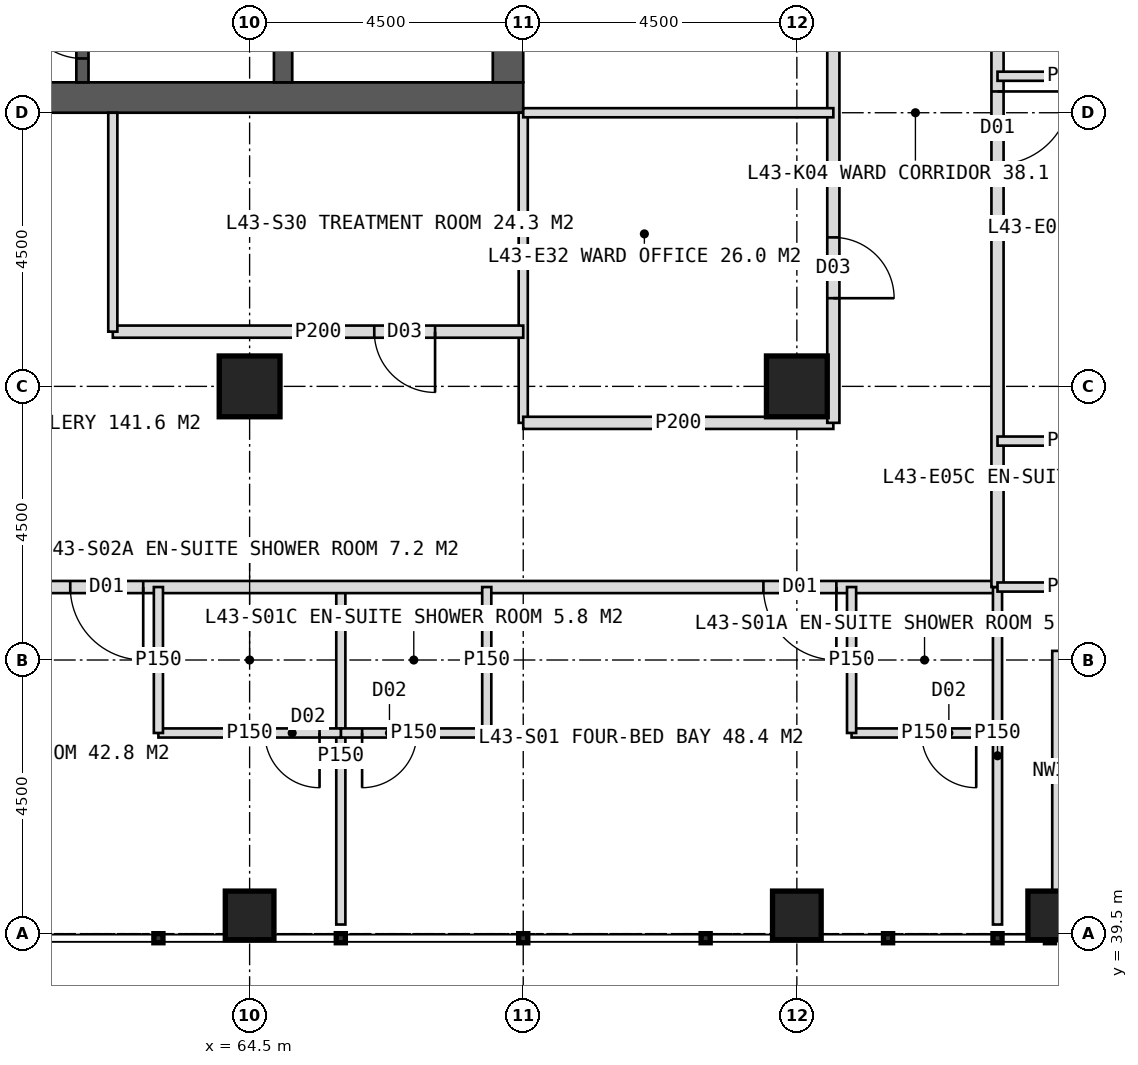
"""IFC4 building model, lengths in metres.
Left out: names, types, materials, properties, quantities, classifications, styles, units other than length and angle.
Written with IfcOpenShell. Run it as: python <this file> out.ifc"""

import sys

from ifc_helpers import new_model, si_unit, direction, frame, frame_2d, origin, origin_2d, place, context, subcontext, project, spatial, rectangle, hollow_rectangle, extrude, element, fill, save


model = new_model("IFC4")
c1 = context("Model", 3, precision=1e-05, world=origin(), true_north=direction((0.0, 1.0)))
c2 = subcontext(c1, "Body", "Model", "MODEL_VIEW")
j1 = project(units=[si_unit("LENGTHUNIT", "METRE"), si_unit("PLANEANGLEUNIT", "RADIAN")], contexts=[c1])
p1 = place(None, origin())
s1 = spatial("IfcSite", under=j1, at=p1, CompositionType="ELEMENT")
p2 = place(p1, origin())
s2 = spatial("IfcBuilding", under=s1, at=p2, CompositionType="ELEMENT")
p3 = place(p2, frame((0.0, 0.0, 181.0)))
s3 = spatial("IfcBuildingStorey", under=s2, at=p3, CompositionType="ELEMENT", Elevation=181.0)
p4 = place(p3, frame((51.0, 53.25, 0.0), z_axis=(0.0, 0.0, 1.0), x_axis=(1.0, 0.0, 0.0)))
e1 = element("IfcWall", 1, at=p4, inside=s3, PredefinedType="SHEAR", context=c2, shape_type="SweptSolid", body=[
    extrude(rectangle(XDim=18.0, YDim=0.5, at=frame_2d((9.0, 0.0))), origin(), (0.0, 0.0, 1.0), 4.0),
])
p5 = place(p4, frame((8.1, 0.0, 0.0)))
e2 = element("IfcOpeningElement", 2, at=p5, cuts=e1, PredefinedType="OPENING", context=c2, shape_type="SweptSolid", body=[
    extrude(rectangle(XDim=1.8, YDim=2.2, at=frame_2d((0.9, 1.1))), frame((0.0, 0.26, 0.0), z_axis=(0.0, -1.0, 0.0), x_axis=(1.0, 0.0, 0.0)), (0.0, 0.0, 1.0), 0.52),
])
p6 = place(p3, frame((68.75, 53.5, 0.0), z_axis=(0.0, 0.0, 1.0), x_axis=(0.0, 1.0, 0.0)))
e3 = element("IfcWall", 3, at=p6, inside=s3, PredefinedType="SHEAR", context=c2, shape_type="SweptSolid", body=[
    extrude(rectangle(XDim=17.0, YDim=0.5, at=frame_2d((8.5, 0.0))), origin(), (0.0, 0.0, 1.0), 4.0),
])
p7 = place(p6, frame((9.6, 0.0, 0.0)))
e4 = element("IfcOpeningElement", 4, at=p7, cuts=e3, PredefinedType="OPENING", context=c2, shape_type="SweptSolid", body=[
    extrude(rectangle(XDim=1.5, YDim=2.2, at=frame_2d((0.75, 1.1))), frame((0.0, 0.26, 0.0), z_axis=(0.0, -1.0, 0.0), x_axis=(1.0, 0.0, 0.0)), (0.0, 0.0, 1.0), 0.52),
])
p8 = place(p3, frame((65.05, 53.5, 0.0), z_axis=(0.0, 0.0, 1.0), x_axis=(0.0, 1.0, 0.0)))
e5 = element("IfcWall", 5, at=p8, inside=s3, PredefinedType="SHEAR", context=c2, shape_type="SweptSolid", body=[
    extrude(rectangle(XDim=17.0, YDim=0.3, at=frame_2d((8.5, 0.0))), origin(), (0.0, 0.0, 1.0), 4.0),
])
p9 = place(p3, frame((61.75, 53.5, 0.0), z_axis=(0.0, 0.0, 1.0), x_axis=(0.0, 1.0, 0.0)))
e6 = element("IfcWall", 6, at=p9, inside=s3, PredefinedType="SHEAR", context=c2, shape_type="SweptSolid", body=[
    extrude(rectangle(XDim=17.0, YDim=0.2, at=frame_2d((8.5, 0.0))), origin(), (0.0, 0.0, 1.0), 4.0),
])
p10 = place(p9, frame((0.393, 0.0, 0.0)))
e7 = element("IfcOpeningElement", 7, at=p10, cuts=e6, PredefinedType="OPENING", context=c2, shape_type="SweptSolid", body=[
    extrude(rectangle(XDim=1.0, YDim=2.1, at=frame_2d((0.5, 1.05))), frame((0.0, 0.11, 0.0), z_axis=(0.0, -1.0, 0.0), x_axis=(1.0, 0.0, 0.0)), (0.0, 0.0, 1.0), 0.22),
])
p11 = place(p9, frame((2.542, 0.0, 0.0)))
e8 = element("IfcOpeningElement", 8, at=p11, cuts=e6, PredefinedType="OPENING", context=c2, shape_type="SweptSolid", body=[
    extrude(rectangle(XDim=1.0, YDim=2.1, at=frame_2d((0.5, 1.05))), frame((0.0, 0.11, 0.0), z_axis=(0.0, -1.0, 0.0), x_axis=(1.0, 0.0, 0.0)), (0.0, 0.0, 1.0), 0.22),
])
p12 = place(p9, frame((5.127, 0.0, 0.0)))
e9 = element("IfcOpeningElement", 9, at=p12, cuts=e6, PredefinedType="OPENING", context=c2, shape_type="SweptSolid", body=[
    extrude(rectangle(XDim=1.0, YDim=2.1, at=frame_2d((0.5, 1.05))), frame((0.0, 0.11, 0.0), z_axis=(0.0, -1.0, 0.0), x_axis=(1.0, 0.0, 0.0)), (0.0, 0.0, 1.0), 0.22),
])
p13 = place(p9, frame((7.228, 0.0, 0.0)))
e10 = element("IfcOpeningElement", 10, at=p13, cuts=e6, PredefinedType="OPENING", context=c2, shape_type="SweptSolid", body=[
    extrude(rectangle(XDim=1.0, YDim=2.1, at=frame_2d((0.5, 1.05))), frame((0.0, 0.11, 0.0), z_axis=(0.0, -1.0, 0.0), x_axis=(1.0, 0.0, 0.0)), (0.0, 0.0, 1.0), 0.22),
])
p14 = place(p9, frame((10.025, 0.0, 0.0)))
e11 = element("IfcOpeningElement", 11, at=p14, cuts=e6, PredefinedType="OPENING", context=c2, shape_type="SweptSolid", body=[
    extrude(rectangle(XDim=1.4, YDim=2.2, at=frame_2d((0.7, 1.1))), frame((0.0, 0.11, 0.0), z_axis=(0.0, -1.0, 0.0), x_axis=(1.0, 0.0, 0.0)), (0.0, 0.0, 1.0), 0.22),
])
p15 = place(p9, frame((14.325, 0.0, 0.0)))
e12 = element("IfcOpeningElement", 12, at=p15, cuts=e6, PredefinedType="OPENING", context=c2, shape_type="SweptSolid", body=[
    extrude(rectangle(XDim=1.4, YDim=2.2, at=frame_2d((0.7, 1.1))), frame((0.0, 0.11, 0.0), z_axis=(0.0, -1.0, 0.0), x_axis=(1.0, 0.0, 0.0)), (0.0, 0.0, 1.0), 0.22),
])
for number, where, z_axis, x_axis in (
    (13, (73.5, 48.5, 0.0), (0.0, 0.0, 1.0), (1.0, 0.0, 0.0)),
    (14, (64.5, 48.5, 0.0), (0.0, 0.0, 1.0), (1.0, 0.0, 0.0)),
):
    element("IfcColumn", number, at=place(p3, frame(where, z_axis=z_axis, x_axis=x_axis)), inside=s3, PredefinedType="COLUMN", context=c2, shape_type="SweptSolid", body=[
        extrude(hollow_rectangle(XDim=1.0, YDim=1.0, WallThickness=0.1, at=origin_2d()), origin(), (0.0, 0.0, 1.0), 4.0),
    ])
for number, where, z_axis, x_axis in (
    (15, (64.5, 39.8, 0.0), (0.0, 0.0, 1.0), (1.0, 0.0, 0.0)),
    (16, (73.5, 39.8, 0.0), (0.0, 0.0, 1.0), (1.0, 0.0, 0.0)),
    (17, (77.7, 39.8, 0.0), (0.0, 0.0, 1.0), (1.0, 0.0, 0.0)),
):
    element("IfcColumn", number, at=place(p3, frame(where, z_axis=z_axis, x_axis=x_axis)), inside=s3, PredefinedType="COLUMN", context=c2, shape_type="SweptSolid", body=[
        extrude(hollow_rectangle(XDim=0.8, YDim=0.8, WallThickness=0.08, at=origin_2d()), origin(), (0.0, 0.0, 1.0), 4.0),
    ])
p16 = place(p3, frame((77.85, 44.15, 0.0), z_axis=(0.0, 0.0, 1.0), x_axis=(0.0, -1.0, 0.0)))
e18 = element("IfcWall", 18, at=p16, inside=s3, PredefinedType="ELEMENTEDWALL", context=c2, shape_type="SweptSolid", body=[
    extrude(rectangle(XDim=3.95, YDim=0.3, at=frame_2d((1.975, 0.0))), origin(), (0.0, 0.0, 1.0), 2.85),
])
p17 = place(p3, frame((66.0, 45.2, 0.0), z_axis=(0.0, 0.0, 1.0), x_axis=(0.0, -1.0, 0.0)))
e19 = element("IfcWall", 19, at=p17, inside=s3, PredefinedType="PARTITIONING", context=c2, shape_type="SweptSolid", body=[
    extrude(rectangle(XDim=5.55, YDim=0.15, at=frame_2d((2.775, 0.0))), origin(), (0.0, 0.0, 1.0), 3.75),
])
p18 = place(p3, frame((76.8, 45.2, 0.0), z_axis=(0.0, 0.0, 1.0), x_axis=(-1.0, 0.0, 0.0)))
e20 = element("IfcWall", 20, at=p18, inside=s3, PredefinedType="PARTITIONING", context=c2, shape_type="SweptSolid", body=[
    extrude(rectangle(XDim=33.6, YDim=0.2, at=frame_2d((16.8, 0.0))), origin(), (0.0, 0.0, 1.0), 3.75),
])
p19 = place(p18, frame((2.65, 0.0, 0.0)))
e21 = element("IfcOpeningElement", 21, at=p19, cuts=e20, PredefinedType="OPENING", context=c2, shape_type="SweptSolid", body=[
    extrude(rectangle(XDim=1.2, YDim=2.2, at=frame_2d((0.6, 1.1))), frame((0.0, 0.11, 0.0), z_axis=(0.0, -1.0, 0.0), x_axis=(1.0, 0.0, 0.0)), (0.0, 0.0, 1.0), 0.22),
])
p20 = place(p18, frame((14.05, 0.0, 0.0)))
e22 = element("IfcOpeningElement", 22, at=p20, cuts=e20, PredefinedType="OPENING", context=c2, shape_type="SweptSolid", body=[
    extrude(rectangle(XDim=1.2, YDim=2.2, at=frame_2d((0.6, 1.1))), frame((0.0, 0.11, 0.0), z_axis=(0.0, -1.0, 0.0), x_axis=(1.0, 0.0, 0.0)), (0.0, 0.0, 1.0), 0.22),
])
p21 = place(p18, frame((22.45, 0.0, 0.0)))
e23 = element("IfcOpeningElement", 23, at=p21, cuts=e20, PredefinedType="OPENING", context=c2, shape_type="SweptSolid", body=[
    extrude(rectangle(XDim=1.2, YDim=2.2, at=frame_2d((0.6, 1.1))), frame((0.0, 0.11, 0.0), z_axis=(0.0, -1.0, 0.0), x_axis=(1.0, 0.0, 0.0)), (0.0, 0.0, 1.0), 0.22),
])
p22 = place(p3, frame((76.8, 45.2, 0.0), z_axis=(0.0, 0.0, 1.0), x_axis=(0.0, -1.0, 0.0)))
e24 = element("IfcWall", 24, at=p22, inside=s3, PredefinedType="PARTITIONING", context=c2, shape_type="SweptSolid", body=[
    extrude(rectangle(XDim=5.55, YDim=0.15, at=frame_2d((2.775, 0.0))), origin(), (0.0, 0.0, 1.0), 3.75),
])
p23 = place(p3, frame((76.8, 42.8, 0.0), z_axis=(0.0, 0.0, 1.0), x_axis=(-1.0, 0.0, 0.0)))
e25 = element("IfcWall", 25, at=p23, inside=s3, PredefinedType="PARTITIONING", context=c2, shape_type="SweptSolid", body=[
    extrude(rectangle(XDim=2.4, YDim=0.15, at=frame_2d((1.2, 0.0))), origin(), (0.0, 0.0, 1.0), 3.75),
])
p24 = place(p23, frame((0.35, 0.0, 0.0)))
e26 = element("IfcOpeningElement", 26, at=p24, cuts=e25, PredefinedType="OPENING", context=c2, shape_type="SweptSolid", body=[
    extrude(rectangle(XDim=0.9, YDim=2.1, at=frame_2d((0.45, 1.05))), frame((0.0, 0.085, 0.0), z_axis=(0.0, -1.0, 0.0), x_axis=(1.0, 0.0, 0.0)), (0.0, 0.0, 1.0), 0.17),
])
p25 = place(p3, frame((74.4, 45.2, 0.0), z_axis=(0.0, 0.0, 1.0), x_axis=(0.0, -1.0, 0.0)))
e27 = element("IfcWall", 27, at=p25, inside=s3, PredefinedType="PARTITIONING", context=c2, shape_type="SweptSolid", body=[
    extrude(rectangle(XDim=2.4, YDim=0.15, at=frame_2d((1.2, 0.0))), origin(), (0.0, 0.0, 1.0), 3.75),
])
p26 = place(p3, frame((68.4, 42.8, 0.0), z_axis=(0.0, 0.0, 1.0), x_axis=(-1.0, 0.0, 0.0)))
e28 = element("IfcWall", 28, at=p26, inside=s3, PredefinedType="PARTITIONING", context=c2, shape_type="SweptSolid", body=[
    extrude(rectangle(XDim=2.4, YDim=0.15, at=frame_2d((1.2, 0.0))), origin(), (0.0, 0.0, 1.0), 3.75),
])
p27 = place(p26, frame((1.15, 0.0, 0.0)))
e29 = element("IfcOpeningElement", 29, at=p27, cuts=e28, PredefinedType="OPENING", context=c2, shape_type="SweptSolid", body=[
    extrude(rectangle(XDim=0.9, YDim=2.1, at=frame_2d((0.45, 1.05))), frame((0.0, 0.085, 0.0), z_axis=(0.0, -1.0, 0.0), x_axis=(1.0, 0.0, 0.0)), (0.0, 0.0, 1.0), 0.17),
])
p28 = place(p3, frame((68.4, 45.2, 0.0), z_axis=(0.0, 0.0, 1.0), x_axis=(0.0, -1.0, 0.0)))
e30 = element("IfcWall", 30, at=p28, inside=s3, PredefinedType="PARTITIONING", context=c2, shape_type="SweptSolid", body=[
    extrude(rectangle(XDim=2.4, YDim=0.15, at=frame_2d((1.2, 0.0))), origin(), (0.0, 0.0, 1.0), 3.75),
])
p29 = place(p3, frame((66.0, 42.8, 0.0), z_axis=(0.0, 0.0, 1.0), x_axis=(-1.0, 0.0, 0.0)))
e31 = element("IfcWall", 31, at=p29, inside=s3, PredefinedType="PARTITIONING", context=c2, shape_type="SweptSolid", body=[
    extrude(rectangle(XDim=3.0, YDim=0.15, at=frame_2d((1.5, 0.0))), origin(), (0.0, 0.0, 1.0), 3.75),
])
p30 = place(p29, frame((0.35, 0.0, 0.0)))
e32 = element("IfcOpeningElement", 32, at=p30, cuts=e31, PredefinedType="OPENING", context=c2, shape_type="SweptSolid", body=[
    extrude(rectangle(XDim=0.9, YDim=2.1, at=frame_2d((0.45, 1.05))), frame((0.0, 0.085, 0.0), z_axis=(0.0, -1.0, 0.0), x_axis=(1.0, 0.0, 0.0)), (0.0, 0.0, 1.0), 0.17),
])
p31 = place(p3, frame((63.0, 45.2, 0.0), z_axis=(0.0, 0.0, 1.0), x_axis=(0.0, -1.0, 0.0)))
e33 = element("IfcWall", 33, at=p31, inside=s3, PredefinedType="PARTITIONING", context=c2, shape_type="SweptSolid", body=[
    extrude(rectangle(XDim=2.4, YDim=0.15, at=frame_2d((1.2, 0.0))), origin(), (0.0, 0.0, 1.0), 3.75),
])
p32 = place(p3, frame((69.0, 53.0, 0.0), z_axis=(0.0, 0.0, 1.0), x_axis=(0.0, -1.0, 0.0)))
e34 = element("IfcWall", 34, at=p32, inside=s3, PredefinedType="PARTITIONING", context=c2, shape_type="SweptSolid", body=[
    extrude(rectangle(XDim=5.1, YDim=0.15, at=frame_2d((2.55, 0.0))), origin(), (0.0, 0.0, 1.0), 3.75),
])
p33 = place(p3, frame((74.1, 47.9, 0.0), z_axis=(0.0, 0.0, 1.0), x_axis=(-1.0, 0.0, 0.0)))
e35 = element("IfcWall", 35, at=p33, inside=s3, PredefinedType="PARTITIONING", context=c2, shape_type="SweptSolid", body=[
    extrude(rectangle(XDim=5.1, YDim=0.2, at=frame_2d((2.55, 0.0))), origin(), (0.0, 0.0, 1.0), 3.75),
])
p34 = place(p3, frame((69.0, 49.4, 0.0), z_axis=(0.0, 0.0, 1.0), x_axis=(-1.0, 0.0, 0.0)))
e36 = element("IfcWall", 36, at=p34, inside=s3, PredefinedType="PARTITIONING", context=c2, shape_type="SweptSolid", body=[
    extrude(rectangle(XDim=6.75, YDim=0.2, at=frame_2d((3.375, 0.0))), origin(), (0.0, 0.0, 1.0), 3.75),
])
p35 = place(p34, frame((1.45, 0.0, 0.0)))
e37 = element("IfcOpeningElement", 37, at=p35, cuts=e36, PredefinedType="OPENING", context=c2, shape_type="SweptSolid", body=[
    extrude(rectangle(XDim=1.0, YDim=2.1, at=frame_2d((0.5, 1.05))), frame((0.0, 0.11, 0.0), z_axis=(0.0, -1.0, 0.0), x_axis=(1.0, 0.0, 0.0)), (0.0, 0.0, 1.0), 0.22),
])
p36 = place(p3, frame((62.25, 53.0, 0.0), z_axis=(0.0, 0.0, 1.0), x_axis=(0.0, -1.0, 0.0)))
e38 = element("IfcWall", 38, at=p36, inside=s3, PredefinedType="PARTITIONING", context=c2, shape_type="SweptSolid", body=[
    extrude(rectangle(XDim=3.6, YDim=0.15, at=frame_2d((1.8, 0.0))), origin(), (0.0, 0.0, 1.0), 3.75),
])
p37 = place(p3, frame((76.8, 78.8, 0.0), z_axis=(0.0, 0.0, 1.0), x_axis=(0.0, -1.0, 0.0)))
e39 = element("IfcWall", 39, at=p37, inside=s3, PredefinedType="PARTITIONING", context=c2, shape_type="SweptSolid", body=[
    extrude(rectangle(XDim=33.6, YDim=0.2, at=frame_2d((16.8, 0.0))), origin(), (0.0, 0.0, 1.0), 3.75),
])
p38 = place(p37, frame((2.65, 0.0, 0.0)))
e40 = element("IfcOpeningElement", 40, at=p38, cuts=e39, PredefinedType="OPENING", context=c2, shape_type="SweptSolid", body=[
    extrude(rectangle(XDim=1.2, YDim=2.2, at=frame_2d((0.6, 1.1))), frame((0.0, 0.11, 0.0), z_axis=(0.0, -1.0, 0.0), x_axis=(1.0, 0.0, 0.0)), (0.0, 0.0, 1.0), 0.22),
])
p39 = place(p37, frame((7.45, 0.0, 0.0)))
e41 = element("IfcOpeningElement", 41, at=p39, cuts=e39, PredefinedType="OPENING", context=c2, shape_type="SweptSolid", body=[
    extrude(rectangle(XDim=1.2, YDim=2.2, at=frame_2d((0.6, 1.1))), frame((0.0, 0.11, 0.0), z_axis=(0.0, -1.0, 0.0), x_axis=(1.0, 0.0, 0.0)), (0.0, 0.0, 1.0), 0.22),
])
p40 = place(p37, frame((13.45, 0.0, 0.0)))
e42 = element("IfcOpeningElement", 42, at=p40, cuts=e39, PredefinedType="OPENING", context=c2, shape_type="SweptSolid", body=[
    extrude(rectangle(XDim=1.2, YDim=2.2, at=frame_2d((0.6, 1.1))), frame((0.0, 0.11, 0.0), z_axis=(0.0, -1.0, 0.0), x_axis=(1.0, 0.0, 0.0)), (0.0, 0.0, 1.0), 0.22),
])
p41 = place(p37, frame((19.45, 0.0, 0.0)))
e43 = element("IfcOpeningElement", 43, at=p41, cuts=e39, PredefinedType="OPENING", context=c2, shape_type="SweptSolid", body=[
    extrude(rectangle(XDim=1.2, YDim=2.2, at=frame_2d((0.6, 1.1))), frame((0.0, 0.11, 0.0), z_axis=(0.0, -1.0, 0.0), x_axis=(1.0, 0.0, 0.0)), (0.0, 0.0, 1.0), 0.22),
])
p42 = place(p37, frame((25.45, 0.0, 0.0)))
e44 = element("IfcOpeningElement", 44, at=p42, cuts=e39, PredefinedType="OPENING", context=c2, shape_type="SweptSolid", body=[
    extrude(rectangle(XDim=1.2, YDim=2.2, at=frame_2d((0.6, 1.1))), frame((0.0, 0.11, 0.0), z_axis=(0.0, -1.0, 0.0), x_axis=(1.0, 0.0, 0.0)), (0.0, 0.0, 1.0), 0.22),
])
for number, where, z_axis, x_axis in (
    (45, (76.8, 53.6, 0.0), (0.0, 0.0, 1.0), (1.0, 0.0, 0.0)),
    (46, (76.8, 47.6, 0.0), (0.0, 0.0, 1.0), (1.0, 0.0, 0.0)),
    (47, (76.8, 45.2, 0.0), (0.0, 0.0, 1.0), (1.0, 0.0, 0.0)),
):
    element("IfcWall", number, at=place(p3, frame(where, z_axis=z_axis, x_axis=x_axis)), inside=s3, PredefinedType="PARTITIONING", context=c2, shape_type="SweptSolid", body=[
        extrude(rectangle(XDim=2.4, YDim=0.15, at=frame_2d((1.2, 0.0))), origin(), (0.0, 0.0, 1.0), 3.75),
    ])
p43 = place(p3, frame((74.1, 62.0, 0.0), z_axis=(0.0, 0.0, 1.0), x_axis=(0.0, -1.0, 0.0)))
e48 = element("IfcWall", 48, at=p43, inside=s3, PredefinedType="PARTITIONING", context=c2, shape_type="SweptSolid", body=[
    extrude(rectangle(XDim=14.1, YDim=0.2, at=frame_2d((7.05, 0.0))), origin(), (0.0, 0.0, 1.0), 3.75),
])
p44 = place(p43, frame((1.45, 0.0, 0.0)))
e49 = element("IfcOpeningElement", 49, at=p44, cuts=e48, PredefinedType="OPENING", context=c2, shape_type="SweptSolid", body=[
    extrude(rectangle(XDim=1.0, YDim=2.1, at=frame_2d((0.5, 1.05))), frame((0.0, 0.11, 0.0), z_axis=(0.0, -1.0, 0.0), x_axis=(1.0, 0.0, 0.0)), (0.0, 0.0, 1.0), 0.22),
])
p45 = place(p43, frame((11.05, 0.0, 0.0)))
e50 = element("IfcOpeningElement", 50, at=p45, cuts=e48, PredefinedType="OPENING", context=c2, shape_type="SweptSolid", body=[
    extrude(rectangle(XDim=1.0, YDim=2.1, at=frame_2d((0.5, 1.05))), frame((0.0, 0.11, 0.0), z_axis=(0.0, -1.0, 0.0), x_axis=(1.0, 0.0, 0.0)), (0.0, 0.0, 1.0), 0.22),
])
p46 = place(p3, frame((69.0, 53.0, 0.0), z_axis=(0.0, 0.0, 1.0), x_axis=(1.0, 0.0, 0.0)))
e51 = element("IfcWall", 51, at=p46, inside=s3, PredefinedType="PARTITIONING", context=c2, shape_type="SweptSolid", body=[
    extrude(rectangle(XDim=5.1, YDim=0.15, at=frame_2d((2.55, 0.0))), origin(), (0.0, 0.0, 1.0), 3.75),
])
p47 = place(p19, origin())
e52 = element("IfcDoor", 52, at=p47, inside=s3, OperationType="SINGLE_SWING_LEFT", PredefinedType="DOOR", context=c2, shape_type="SweptSolid", body=[
    extrude(rectangle(XDim=1.2, YDim=2.2, at=frame_2d((0.6, 1.1))), frame((0.0, 0.025, 0.0), z_axis=(0.0, -1.0, 0.0), x_axis=(1.0, 0.0, 0.0)), (0.0, 0.0, 1.0), 0.05),
])
fill(e21, e52)
p48 = place(p24, origin())
e53 = element("IfcDoor", 53, at=p48, inside=s3, OperationType="SINGLE_SWING_LEFT", PredefinedType="DOOR", context=c2, shape_type="SweptSolid", body=[
    extrude(rectangle(XDim=0.9, YDim=2.1, at=frame_2d((0.45, 1.05))), frame((0.0, 0.025, 0.0), z_axis=(0.0, -1.0, 0.0), x_axis=(1.0, 0.0, 0.0)), (0.0, 0.0, 1.0), 0.05),
])
fill(e26, e53)
p49 = place(p27, origin())
e54 = element("IfcDoor", 54, at=p49, inside=s3, OperationType="SINGLE_SWING_RIGHT", PredefinedType="DOOR", context=c2, shape_type="SweptSolid", body=[
    extrude(rectangle(XDim=0.9, YDim=2.1, at=frame_2d((0.45, 1.05))), frame((0.0, 0.025, 0.0), z_axis=(0.0, -1.0, 0.0), x_axis=(1.0, 0.0, 0.0)), (0.0, 0.0, 1.0), 0.05),
])
fill(e29, e54)
p50 = place(p20, origin())
e55 = element("IfcDoor", 55, at=p50, inside=s3, OperationType="SINGLE_SWING_LEFT", PredefinedType="DOOR", context=c2, shape_type="SweptSolid", body=[
    extrude(rectangle(XDim=1.2, YDim=2.2, at=frame_2d((0.6, 1.1))), frame((0.0, 0.025, 0.0), z_axis=(0.0, -1.0, 0.0), x_axis=(1.0, 0.0, 0.0)), (0.0, 0.0, 1.0), 0.05),
])
fill(e22, e55)
p51 = place(p30, origin())
e56 = element("IfcDoor", 56, at=p51, inside=s3, OperationType="SINGLE_SWING_LEFT", PredefinedType="DOOR", context=c2, shape_type="SweptSolid", body=[
    extrude(rectangle(XDim=0.9, YDim=2.1, at=frame_2d((0.45, 1.05))), frame((0.0, 0.025, 0.0), z_axis=(0.0, -1.0, 0.0), x_axis=(1.0, 0.0, 0.0)), (0.0, 0.0, 1.0), 0.05),
])
fill(e32, e56)
p52 = place(p35, origin())
e57 = element("IfcDoor", 57, at=p52, inside=s3, OperationType="SINGLE_SWING_LEFT", PredefinedType="DOOR", context=c2, shape_type="SweptSolid", body=[
    extrude(rectangle(XDim=1.0, YDim=2.1, at=frame_2d((0.5, 1.05))), frame((0.0, 0.025, 0.0), z_axis=(0.0, -1.0, 0.0), x_axis=(1.0, 0.0, 0.0)), (0.0, 0.0, 1.0), 0.05),
])
fill(e37, e57)
p53 = place(p42, origin())
e58 = element("IfcDoor", 58, at=p53, inside=s3, OperationType="SINGLE_SWING_LEFT", PredefinedType="DOOR", context=c2, shape_type="SweptSolid", body=[
    extrude(rectangle(XDim=1.2, YDim=2.2, at=frame_2d((0.6, 1.1))), frame((0.0, 0.025, 0.0), z_axis=(0.0, -1.0, 0.0), x_axis=(1.0, 0.0, 0.0)), (0.0, 0.0, 1.0), 0.05),
])
fill(e44, e58)
p54 = place(p45, origin())
e59 = element("IfcDoor", 59, at=p54, inside=s3, OperationType="SINGLE_SWING_RIGHT", PredefinedType="DOOR", context=c2, shape_type="SweptSolid", body=[
    extrude(rectangle(XDim=1.0, YDim=2.1, at=frame_2d((0.5, 1.05))), frame((0.0, 0.025, 0.0), z_axis=(0.0, -1.0, 0.0), x_axis=(1.0, 0.0, 0.0)), (0.0, 0.0, 1.0), 0.05),
])
fill(e50, e59)
p55 = place(p10, origin())
e60 = element("IfcDoor", 60, at=p55, inside=s3, OperationType="SINGLE_SWING_RIGHT", PredefinedType="DOOR", context=c2, shape_type="SweptSolid", body=[
    extrude(rectangle(XDim=1.0, YDim=2.1, at=frame_2d((0.5, 1.05))), frame((0.0, 0.025, 0.0), z_axis=(0.0, -1.0, 0.0), x_axis=(1.0, 0.0, 0.0)), (0.0, 0.0, 1.0), 0.05),
])
fill(e7, e60)
save(model, sys.argv[1])
